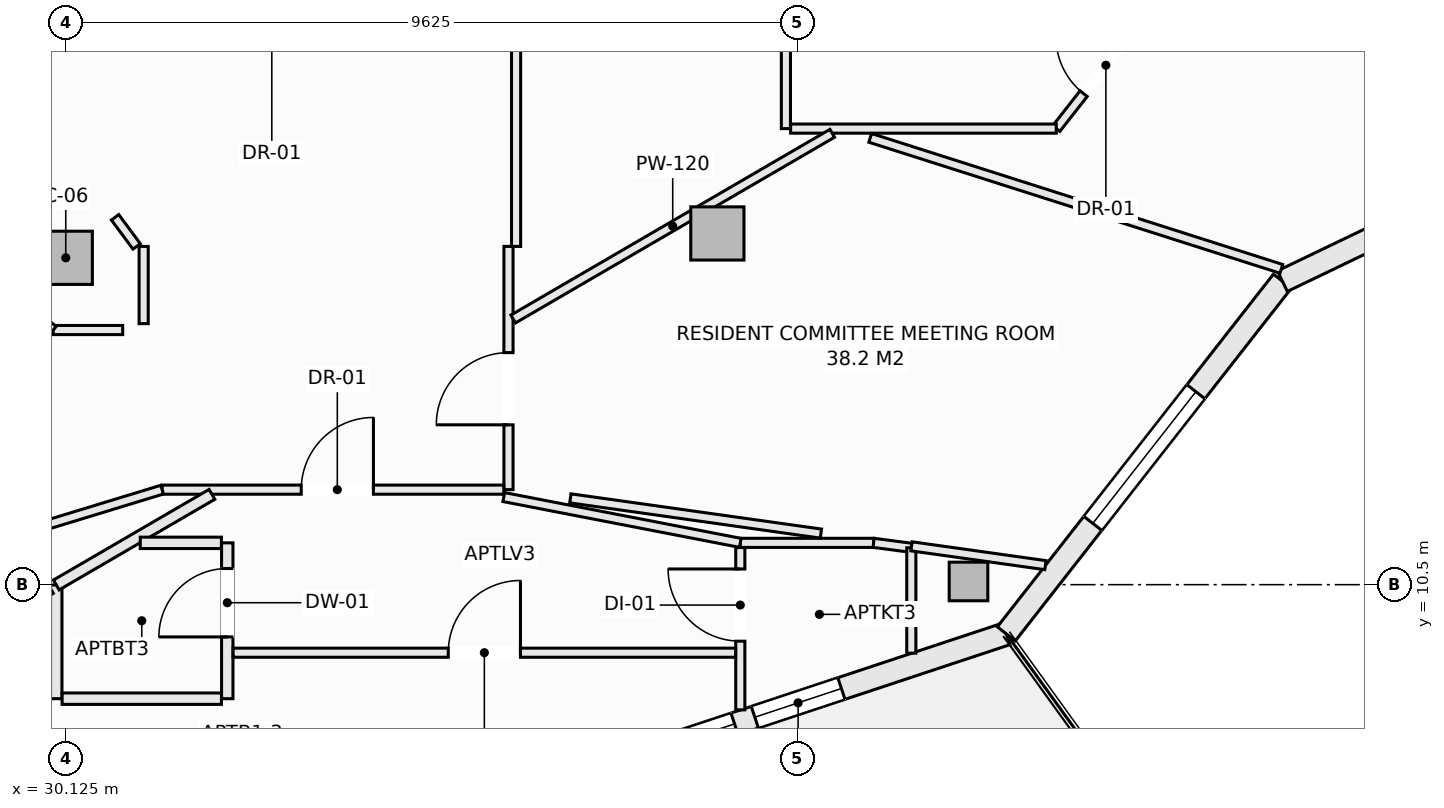
"""IFC4 building model, lengths in metres.
Left out: names, types, materials, properties, quantities, classifications, styles, units other than length and angle.
Written with IfcOpenShell. Run it as: python <this file> out.ifc"""

import sys

from ifc_helpers import new_model, si_unit, direction, frame, frame_2d, origin, origin_2d, place, context, subcontext, project, spatial, rectangle, hollow_rectangle, extrude, element, fill, save


model = new_model("IFC4")
c1 = context("Model", 3, precision=1e-05, world=origin(), true_north=direction((0.0, 1.0)))
c2 = subcontext(c1, "Body", "Model", "MODEL_VIEW")
j1 = project(units=[si_unit("LENGTHUNIT", "METRE"), si_unit("PLANEANGLEUNIT", "RADIAN")], contexts=[c1])
p1 = place(None, origin())
s1 = spatial("IfcSite", under=j1, at=p1, CompositionType="ELEMENT")
p2 = place(p1, origin())
s2 = spatial("IfcBuilding", under=s1, at=p2, CompositionType="ELEMENT")
p3 = place(p2, frame((0.0, 0.0, 229.4)))
s3 = spatial("IfcBuildingStorey", under=s2, at=p3, CompositionType="ELEMENT", Elevation=229.4)
p4 = place(p3, frame((42.003, 10.542, -0.27), z_axis=(0.0, 0.0, 1.0), x_axis=(1.0, 0.0, 0.0)))
e1 = element("IfcColumn", 1, at=p4, inside=s3, PredefinedType="COLUMN", context=c2, shape_type="SweptSolid", body=[
    extrude(hollow_rectangle(XDim=0.508, YDim=0.508, WallThickness=0.019, at=origin_2d()), origin(), (0.0, 0.0, 1.0), 3.3),
])
for number, where, z_axis, x_axis in (
    (2, (30.125, 14.8, -0.27), (0.0, 0.0, 1.0), (1.0, 0.0, 0.0)),
    (3, (38.698, 15.121, -0.27), (0.0, 0.0, 1.0), (1.0, 0.0, 0.0)),
):
    element("IfcColumn", number, at=place(p3, frame(where, z_axis=z_axis, x_axis=x_axis)), inside=s3, PredefinedType="COLUMN", context=c2, shape_type="SweptSolid", body=[
        extrude(rectangle(XDim=0.7, YDim=0.7, at=origin_2d()), origin(), (0.0, 0.0, 1.0), 3.3),
    ])
p5 = place(p3, frame((36.531, 7.875, 0.0), z_axis=(0.0, 0.0, 1.0), x_axis=(0.949240877604, 0.314550085495, 0.0)))
e4 = element("IfcWall", 4, at=p5, inside=s3, PredefinedType="SOLIDWALL", context=c2, shape_type="SweptSolid", body=[
    extrude(rectangle(XDim=6.288, YDim=0.3, at=frame_2d((3.144, 0.0))), origin(), (0.0, 0.0, 1.0), 2.605),
])
p6 = place(p5, frame((1.322, 0.0, 0.72)))
e5 = element("IfcOpeningElement", 5, at=p6, cuts=e4, PredefinedType="OPENING", context=c2, shape_type="SweptSolid", body=[
    extrude(rectangle(XDim=1.2, YDim=1.65, at=frame_2d((0.6, 0.825))), frame((0.0, 0.16, 0.0), z_axis=(0.0, -1.0, 0.0), x_axis=(1.0, 0.0, 0.0)), (0.0, 0.0, 1.0), 0.32),
])
p7 = place(p5, frame((2.802, 0.0, 0.72)))
e6 = element("IfcOpeningElement", 6, at=p7, cuts=e4, PredefinedType="OPENING", context=c2, shape_type="SweptSolid", body=[
    extrude(rectangle(XDim=1.2, YDim=1.65, at=frame_2d((0.6, 0.825))), frame((0.0, 0.16, 0.0), z_axis=(0.0, -1.0, 0.0), x_axis=(1.0, 0.0, 0.0)), (0.0, 0.0, 1.0), 0.32),
])
p8 = place(p3, frame((42.5, 9.853, 0.0), z_axis=(0.0, 0.0, 1.0), x_axis=(0.616450126935, 0.787393955401, 0.0)))
e7 = element("IfcWall", 7, at=p8, inside=s3, PredefinedType="SOLIDWALL", context=c2, shape_type="SweptSolid", body=[
    extrude(rectangle(XDim=5.893, YDim=0.3, at=frame_2d((2.946, 0.0))), origin(), (0.0, 0.0, 1.0), 2.605),
])
p9 = place(p8, frame((1.846, 0.0, 0.72)))
e8 = element("IfcOpeningElement", 8, at=p9, cuts=e7, PredefinedType="OPENING", context=c2, shape_type="SweptSolid", body=[
    extrude(rectangle(XDim=2.2, YDim=1.65, at=frame_2d((1.1, 0.825))), frame((0.0, 0.16, 0.0), z_axis=(0.0, -1.0, 0.0), x_axis=(1.0, 0.0, 0.0)), (0.0, 0.0, 1.0), 0.32),
])
p10 = place(p3, frame((46.133, 14.493, 0.0), z_axis=(0.0, 0.0, 1.0), x_axis=(0.901348331142, 0.433094892545, 0.0)))
e9 = element("IfcWall", 9, at=p10, inside=s3, PredefinedType="SOLIDWALL", context=c2, shape_type="SweptSolid", body=[
    extrude(rectangle(XDim=6.021, YDim=0.3, at=frame_2d((3.01, 0.0))), origin(), (0.0, 0.0, 1.0), 2.605),
])
p11 = place(p10, frame((1.91, 0.0, 0.72)))
e10 = element("IfcOpeningElement", 10, at=p11, cuts=e9, PredefinedType="OPENING", context=c2, shape_type="SweptSolid", body=[
    extrude(rectangle(XDim=2.2, YDim=1.65, at=frame_2d((1.1, 0.825))), frame((0.0, 0.16, 0.0), z_axis=(0.0, -1.0, 0.0), x_axis=(1.0, 0.0, 0.0)), (0.0, 0.0, 1.0), 0.32),
])
p12 = place(p3, frame((30.0, 9.0, 0.0), z_axis=(0.0, 0.0, 1.0), x_axis=(0.0, 1.0, 0.0)))
e11 = element("IfcWall", 11, at=p12, inside=s3, PredefinedType="PARTITIONING", context=c2, shape_type="SweptSolid", body=[
    extrude(rectangle(XDim=1.496, YDim=0.15, at=frame_2d((0.748, 0.0))), origin(), (0.0, 0.0, 1.0), 2.77),
])
p13 = place(p3, frame((39.6, 16.5, 0.0), z_axis=(0.0, 0.0, 1.0), x_axis=(0.0, 1.0, 0.0)))
e12 = element("IfcWall", 12, at=p13, inside=s3, PredefinedType="PARTITIONING", context=c2, shape_type="SweptSolid", body=[
    extrude(rectangle(XDim=6.52, YDim=0.12, at=frame_2d((3.26, 0.0))), origin(), (0.0, 0.0, 1.0), 2.478),
])
p14 = place(p3, frame((43.157, 16.5, 0.0), z_axis=(0.0, 0.0, 1.0), x_axis=(0.616566276607, 0.787303008092, 0.0)))
e13 = element("IfcWall", 13, at=p14, inside=s3, PredefinedType="PARTITIONING", context=c2, shape_type="SweptSolid", body=[
    extrude(rectangle(XDim=2.398, YDim=0.12, at=frame_2d((1.199, 0.0))), origin(), (0.0, 0.0, 1.0), 3.03),
])
p15 = place(p14, frame((0.584, 0.0, 0.0)))
e14 = element("IfcOpeningElement", 14, at=p15, cuts=e13, PredefinedType="OPENING", context=c2, shape_type="SweptSolid", body=[
    extrude(rectangle(XDim=0.95, YDim=2.1, at=frame_2d((0.475, 1.05))), frame((0.0, 0.07, 0.0), z_axis=(0.0, -1.0, 0.0), x_axis=(1.0, 0.0, 0.0)), (0.0, 0.0, 1.0), 0.14),
])
p16 = place(p3, frame((39.662, 16.5, 0.0), z_axis=(0.0, 0.0, 1.0), x_axis=(1.0, 0.0, 0.0)))
e15 = element("IfcWall", 15, at=p16, inside=s3, PredefinedType="PARTITIONING", context=c2, shape_type="SweptSolid", body=[
    extrude(rectangle(XDim=3.495, YDim=0.12, at=frame_2d((1.748, 0.0))), origin(), (0.0, 0.0, 1.0), 2.77),
])
p17 = place(p3, frame((36.05, 14.95, 0.0), z_axis=(0.0, 0.0, 1.0), x_axis=(0.0, 1.0, 0.0)))
e16 = element("IfcWall", 16, at=p17, inside=s3, PredefinedType="PARTITIONING", context=c2, shape_type="SweptSolid", body=[
    extrude(rectangle(XDim=2.578, YDim=0.12, at=frame_2d((1.289, 0.0))), origin(), (0.0, 0.0, 1.0), 3.03),
])
p18 = place(p3, frame((35.95, 11.75, 0.0), z_axis=(0.0, 0.0, 1.0), x_axis=(0.0, 1.0, 0.0)))
e17 = element("IfcWall", 17, at=p18, inside=s3, PredefinedType="PARTITIONING", context=c2, shape_type="SweptSolid", body=[
    extrude(rectangle(XDim=3.2, YDim=0.12, at=frame_2d((1.6, 0.0))), origin(), (0.0, 0.0, 1.0), 3.03),
])
p19 = place(p18, frame((0.853, 0.0, 0.0)))
e18 = element("IfcOpeningElement", 18, at=p19, cuts=e17, PredefinedType="OPENING", context=c2, shape_type="SweptSolid", body=[
    extrude(rectangle(XDim=0.95, YDim=2.1, at=frame_2d((0.475, 1.05))), frame((0.0, 0.07, 0.0), z_axis=(0.0, -1.0, 0.0), x_axis=(1.0, 0.0, 0.0)), (0.0, 0.0, 1.0), 0.14),
])
p20 = place(p3, frame((31.393, 11.75, 0.0), z_axis=(0.0, 0.0, 1.0), x_axis=(1.0, 0.0, 0.0)))
e19 = element("IfcWall", 19, at=p20, inside=s3, PredefinedType="PARTITIONING", context=c2, shape_type="SweptSolid", body=[
    extrude(rectangle(XDim=4.495, YDim=0.12, at=frame_2d((2.248, 0.0))), origin(), (0.0, 0.0, 1.0), 3.03),
])
p21 = place(p20, frame((1.83, 0.0, 0.0)))
e20 = element("IfcOpeningElement", 20, at=p21, cuts=e19, PredefinedType="OPENING", context=c2, shape_type="SweptSolid", body=[
    extrude(rectangle(XDim=0.95, YDim=2.1, at=frame_2d((0.475, 1.05))), frame((0.0, 0.07, 0.0), z_axis=(0.0, -1.0, 0.0), x_axis=(1.0, 0.0, 0.0)), (0.0, 0.0, 1.0), 0.14),
])
p22 = place(p3, frame((28.752, 10.944, 0.0), z_axis=(0.0, 0.0, 1.0), x_axis=(0.956462690075, 0.291854625618, 0.0)))
e21 = element("IfcWall", 21, at=p22, inside=s3, PredefinedType="PARTITIONING", context=c2, shape_type="SweptSolid", body=[
    extrude(rectangle(XDim=2.761, YDim=0.12, at=frame_2d((1.381, 0.0))), origin(), (0.0, 0.0, 1.0), 3.03),
])
p23 = place(p3, frame((29.96, 13.85, 0.0), z_axis=(0.0, 0.0, 1.0), x_axis=(1.0, 0.0, 0.0)))
e22 = element("IfcWall", 22, at=p23, inside=s3, PredefinedType="PARTITIONING", context=c2, shape_type="SweptSolid", body=[
    extrude(rectangle(XDim=0.914, YDim=0.12, at=frame_2d((0.457, 0.0))), origin(), (0.0, 0.0, 1.0), 3.03),
])
p24 = place(p3, frame((31.15, 13.934, 0.0), z_axis=(0.0, 0.0, 1.0), x_axis=(0.0, 1.0, 0.0)))
e23 = element("IfcWall", 23, at=p24, inside=s3, PredefinedType="PARTITIONING", context=c2, shape_type="SweptSolid", body=[
    extrude(rectangle(XDim=1.016, YDim=0.12, at=frame_2d((0.508, 0.0))), origin(), (0.0, 0.0, 1.0), 3.03),
])
p25 = place(p3, frame((30.774, 15.333, 0.0), z_axis=(0.0, 0.0, 1.0), x_axis=(0.595814974861, -0.803121731577, 0.0)))
e24 = element("IfcWall", 24, at=p25, inside=s3, PredefinedType="PARTITIONING", context=c2, shape_type="SweptSolid", body=[
    extrude(rectangle(XDim=0.477, YDim=0.12, at=frame_2d((0.239, 0.0))), origin(), (0.0, 0.0, 1.0), 3.03),
])
p26 = place(p3, frame((29.531, 14.206, 0.0), z_axis=(0.0, 0.0, 1.0), x_axis=(0.7695479554, -0.638589026166, 0.0)))
e25 = element("IfcWall", 25, at=p26, inside=s3, PredefinedType="PARTITIONING", context=c2, shape_type="SweptSolid", body=[
    extrude(rectangle(XDim=0.557, YDim=0.12, at=frame_2d((0.279, 0.0))), origin(), (0.0, 0.0, 1.0), 3.03),
])
p27 = place(p3, frame((25.447, 7.846, 0.0), z_axis=(0.0, 0.0, 1.0), x_axis=(0.864279409289, 0.503012030353, 0.0)))
e26 = element("IfcWall", 26, at=p27, inside=s3, PredefinedType="PARTITIONING", context=c2, shape_type="SweptSolid", body=[
    extrude(rectangle(XDim=5.179, YDim=0.15, at=frame_2d((2.59, 0.0))), origin(), (0.0, 0.0, 1.0), 3.03),
])
p28 = place(p3, frame((30.0, 10.496, 0.0), z_axis=(0.0, 0.0, 1.0), x_axis=(0.864297850125, 0.50298034382, 0.0)))
e27 = element("IfcWall", 27, at=p28, inside=s3, PredefinedType="PARTITIONING", context=c2, shape_type="SweptSolid", body=[
    extrude(rectangle(XDim=2.37, YDim=0.15, at=frame_2d((1.185, 0.0))), origin(), (0.0, 0.0, 1.0), 3.03),
])
p29 = place(p3, frame((36.012, 13.995, 0.0), z_axis=(0.0, 0.0, 1.0), x_axis=(0.864278013608, 0.503014428415, 0.0)))
e28 = element("IfcWall", 28, at=p29, inside=s3, PredefinedType="PARTITIONING", context=c2, shape_type="SweptSolid", body=[
    extrude(rectangle(XDim=4.857, YDim=0.12, at=frame_2d((2.428, 0.0))), origin(), (0.0, 0.0, 1.0), 2.478),
])
p30 = place(p3, frame((32.25, 9.0, 0.0), z_axis=(0.0, 0.0, 1.0), x_axis=(0.0, 1.0, 0.0)))
e29 = element("IfcWall", 29, at=p30, inside=s3, PredefinedType="PARTITIONING", context=c2, shape_type="SweptSolid", body=[
    extrude(rectangle(XDim=2.05, YDim=0.15, at=frame_2d((1.025, 0.0))), origin(), (0.0, 0.0, 1.0), 3.03),
])
p31 = place(p30, frame((0.812, 0.0, 0.0)))
e30 = element("IfcOpeningElement", 30, at=p31, cuts=e29, PredefinedType="OPENING", context=c2, shape_type="SweptSolid", body=[
    extrude(rectangle(XDim=0.9, YDim=2.1, at=frame_2d((0.45, 1.05))), frame((0.0, 0.085, 0.0), z_axis=(0.0, -1.0, 0.0), x_axis=(1.0, 0.0, 0.0)), (0.0, 0.0, 1.0), 0.17),
])
p32 = place(p3, frame((31.105, 11.05, 0.0), z_axis=(0.0, 0.0, 1.0), x_axis=(1.0, 0.0, 0.0)))
e31 = element("IfcWall", 31, at=p32, inside=s3, PredefinedType="PARTITIONING", context=c2, shape_type="SweptSolid", body=[
    extrude(rectangle(XDim=1.068, YDim=0.15, at=frame_2d((0.534, 0.0))), origin(), (0.0, 0.0, 1.0), 3.03),
])
p33 = place(p3, frame((39.0, 11.05, 0.0), z_axis=(0.0, 0.0, 1.0), x_axis=(1.0, 0.0, 0.0)))
e32 = element("IfcWall", 32, at=p33, inside=s3, PredefinedType="PARTITIONING", context=c2, shape_type="SweptSolid", body=[
    extrude(rectangle(XDim=1.754, YDim=0.12, at=frame_2d((0.877, 0.0))), origin(), (0.0, 0.0, 1.0), 3.03),
])
p34 = place(p3, frame((35.888, 11.652, 0.0), z_axis=(0.0, 0.0, 1.0), x_axis=(0.981782168089, -0.190009932429, 0.0)))
e33 = element("IfcWall", 33, at=p34, inside=s3, PredefinedType="PARTITIONING", context=c2, shape_type="SweptSolid", body=[
    extrude(rectangle(XDim=3.17, YDim=0.12, at=frame_2d((1.585, 0.0))), origin(), (0.0, 0.0, 1.0), 3.03),
])
p35 = place(p3, frame((39.0, 8.853, 0.0), z_axis=(0.0, 0.0, 1.0), x_axis=(0.0, 1.0, 0.0)))
e34 = element("IfcWall", 34, at=p35, inside=s3, PredefinedType="PARTITIONING", context=c2, shape_type="SweptSolid", body=[
    extrude(rectangle(XDim=2.135, YDim=0.12, at=frame_2d((1.067, 0.0))), origin(), (0.0, 0.0, 1.0), 3.03),
])
p36 = place(p35, frame((0.904, 0.0, 0.0)))
e35 = element("IfcOpeningElement", 35, at=p36, cuts=e34, PredefinedType="OPENING", context=c2, shape_type="SweptSolid", body=[
    extrude(rectangle(XDim=0.95, YDim=2.1, at=frame_2d((0.475, 1.05))), frame((0.0, 0.07, 0.0), z_axis=(0.0, -1.0, 0.0), x_axis=(1.0, 0.0, 0.0)), (0.0, 0.0, 1.0), 0.14),
])
p37 = place(p3, frame((32.327, 9.605, 0.0), z_axis=(0.0, 0.0, 1.0), x_axis=(1.0, 0.0, 0.0)))
e36 = element("IfcWall", 36, at=p37, inside=s3, PredefinedType="PARTITIONING", context=c2, shape_type="SweptSolid", body=[
    extrude(rectangle(XDim=6.611, YDim=0.12, at=frame_2d((3.306, 0.0))), origin(), (0.0, 0.0, 1.0), 2.605),
])
p38 = place(p37, frame((2.831, 0.0, 0.0)))
e37 = element("IfcOpeningElement", 37, at=p38, cuts=e36, PredefinedType="OPENING", context=c2, shape_type="SweptSolid", body=[
    extrude(rectangle(XDim=0.95, YDim=2.1, at=frame_2d((0.475, 1.05))), frame((0.0, 0.07, 0.0), z_axis=(0.0, -1.0, 0.0), x_axis=(1.0, 0.0, 0.0)), (0.0, 0.0, 1.0), 0.14),
])
p39 = place(p3, frame((40.754, 11.05, 0.0), z_axis=(0.0, 0.0, 1.0), x_axis=(0.991540443372, -0.129798109221, 0.0)))
e38 = element("IfcWall", 38, at=p39, inside=s3, PredefinedType="PARTITIONING", context=c2, shape_type="SweptSolid", body=[
    extrude(rectangle(XDim=0.5, YDim=0.12, at=frame_2d((0.25, 0.0))), origin(), (0.0, 0.0, 1.0), 3.03),
])
p40 = place(p3, frame((41.25, 9.599, 0.0), z_axis=(0.0, 0.0, 1.0), x_axis=(0.0, 1.0, 0.0)))
e39 = element("IfcWall", 39, at=p40, inside=s3, PredefinedType="PARTITIONING", context=c2, shape_type="SweptSolid", body=[
    extrude(rectangle(XDim=1.386, YDim=0.12, at=frame_2d((0.693, 0.0))), origin(), (0.0, 0.0, 1.0), 3.03),
])
p41 = place(p3, frame((30.077, 9.0, 0.0), z_axis=(0.0, 0.0, 1.0), x_axis=(1.0, 0.0, 0.0)))
e40 = element("IfcWall", 40, at=p41, inside=s3, PredefinedType="PARTITIONING", context=c2, shape_type="SweptSolid", body=[
    extrude(rectangle(XDim=2.096, YDim=0.15, at=frame_2d((1.048, 0.0))), origin(), (0.0, 0.0, 1.0), 3.03),
])
p42 = place(p3, frame((40.709, 16.378, 0.0), z_axis=(0.0, 0.0, 1.0), x_axis=(0.95282972489, -0.303505379469, 0.0)))
e41 = element("IfcWall", 41, at=p42, inside=s3, PredefinedType="PARTITIONING", context=c2, shape_type="SweptSolid", body=[
    extrude(rectangle(XDim=5.677, YDim=0.12, at=frame_2d((2.839, 0.0))), origin(), (0.0, 0.0, 1.0), 2.77),
])
p43 = place(p3, frame((36.764, 11.635, 0.0), z_axis=(0.0, 0.0, 1.0), x_axis=(0.990262425383, -0.139213249639, 0.0)))
e42 = element("IfcWall", 42, at=p43, inside=s3, PredefinedType="PARTITIONING", context=c2, shape_type="SweptSolid", body=[
    extrude(rectangle(XDim=3.329, YDim=0.12, at=frame_2d((1.664, 0.0))), origin(), (0.0, 0.0, 1.0), 3.03),
])
p44 = place(p3, frame((41.252, 11.004, 0.0), z_axis=(0.0, 0.0, 1.0), x_axis=(0.990257170036, -0.139250627263, 0.0)))
e43 = element("IfcWall", 43, at=p44, inside=s3, PredefinedType="PARTITIONING", context=c2, shape_type="SweptSolid", body=[
    extrude(rectangle(XDim=1.78, YDim=0.12, at=frame_2d((0.89, 0.0))), origin(), (0.0, 0.0, 1.0), 3.03),
])
p45 = place(p6, origin())
e44 = element("IfcWindow", 44, at=p45, inside=s3, PartitioningType="SINGLE_PANEL", PredefinedType="WINDOW", context=c2, shape_type="SweptSolid", body=[
    extrude(rectangle(XDim=1.2, YDim=1.65, at=frame_2d((0.6, 0.825))), frame((0.0, 0.03, 0.0), z_axis=(0.0, -1.0, 0.0), x_axis=(1.0, 0.0, 0.0)), (0.0, 0.0, 1.0), 0.06),
])
fill(e5, e44)
p46 = place(p9, origin())
e45 = element("IfcWindow", 45, at=p46, inside=s3, PartitioningType="SINGLE_PANEL", PredefinedType="WINDOW", context=c2, shape_type="SweptSolid", body=[
    extrude(rectangle(XDim=2.2, YDim=1.65, at=frame_2d((1.1, 0.825))), frame((0.0, 0.03, 0.0), z_axis=(0.0, -1.0, 0.0), x_axis=(1.0, 0.0, 0.0)), (0.0, 0.0, 1.0), 0.06),
])
fill(e8, e45)
p47 = place(p21, origin())
e46 = element("IfcDoor", 46, at=p47, inside=s3, OperationType="SINGLE_SWING_RIGHT", PredefinedType="DOOR", context=c2, shape_type="SweptSolid", body=[
    extrude(rectangle(XDim=0.95, YDim=2.1, at=frame_2d((0.475, 1.05))), frame((0.0, 0.025, 0.0), z_axis=(0.0, -1.0, 0.0), x_axis=(1.0, 0.0, 0.0)), (0.0, 0.0, 1.0), 0.05),
])
fill(e20, e46)
p48 = place(p19, origin())
e47 = element("IfcDoor", 47, at=p48, inside=s3, OperationType="SINGLE_SWING_LEFT", PredefinedType="DOOR", context=c2, shape_type="SweptSolid", body=[
    extrude(rectangle(XDim=0.95, YDim=2.1, at=frame_2d((0.475, 1.05))), frame((0.0, 0.025, 0.0), z_axis=(0.0, -1.0, 0.0), x_axis=(1.0, 0.0, 0.0)), (0.0, 0.0, 1.0), 0.05),
])
fill(e18, e47)
p49 = place(p15, origin())
e48 = element("IfcDoor", 48, at=p49, inside=s3, OperationType="SINGLE_SWING_RIGHT", PredefinedType="DOOR", context=c2, shape_type="SweptSolid", body=[
    extrude(rectangle(XDim=0.95, YDim=2.1, at=frame_2d((0.475, 1.05))), frame((0.0, 0.025, 0.0), z_axis=(0.0, -1.0, 0.0), x_axis=(1.0, 0.0, 0.0)), (0.0, 0.0, 1.0), 0.05),
])
fill(e14, e48)
p50 = place(p36, origin())
e49 = element("IfcDoor", 49, at=p50, inside=s3, OperationType="SINGLE_SWING_RIGHT", PredefinedType="DOOR", context=c2, shape_type="SweptSolid", body=[
    extrude(rectangle(XDim=0.95, YDim=2.1, at=frame_2d((0.475, 1.05))), frame((0.0, 0.025, 0.0), z_axis=(0.0, -1.0, 0.0), x_axis=(1.0, 0.0, 0.0)), (0.0, 0.0, 1.0), 0.05),
])
fill(e35, e49)
p51 = place(p31, origin())
e50 = element("IfcDoor", 50, at=p51, inside=s3, OperationType="SINGLE_SWING_LEFT", PredefinedType="DOOR", context=c2, shape_type="SweptSolid", body=[
    extrude(rectangle(XDim=0.9, YDim=2.1, at=frame_2d((0.45, 1.05))), frame((0.0, 0.025, 0.0), z_axis=(0.0, -1.0, 0.0), x_axis=(1.0, 0.0, 0.0)), (0.0, 0.0, 1.0), 0.05),
])
fill(e30, e50)
p52 = place(p38, origin())
e51 = element("IfcDoor", 51, at=p52, inside=s3, OperationType="SINGLE_SWING_RIGHT", PredefinedType="DOOR", context=c2, shape_type="SweptSolid", body=[
    extrude(rectangle(XDim=0.95, YDim=2.1, at=frame_2d((0.475, 1.05))), frame((0.0, 0.025, 0.0), z_axis=(0.0, -1.0, 0.0), x_axis=(1.0, 0.0, 0.0)), (0.0, 0.0, 1.0), 0.05),
])
fill(e37, e51)
p53 = place(p7, origin())
e52 = element("IfcWindow", 52, at=p53, inside=s3, PartitioningType="SINGLE_PANEL", PredefinedType="WINDOW", context=c2, shape_type="SweptSolid", body=[
    extrude(rectangle(XDim=1.2, YDim=1.65, at=frame_2d((0.6, 0.825))), frame((0.0, 0.03, 0.0), z_axis=(0.0, -1.0, 0.0), x_axis=(1.0, 0.0, 0.0)), (0.0, 0.0, 1.0), 0.06),
])
fill(e6, e52)
save(model, sys.argv[1])
